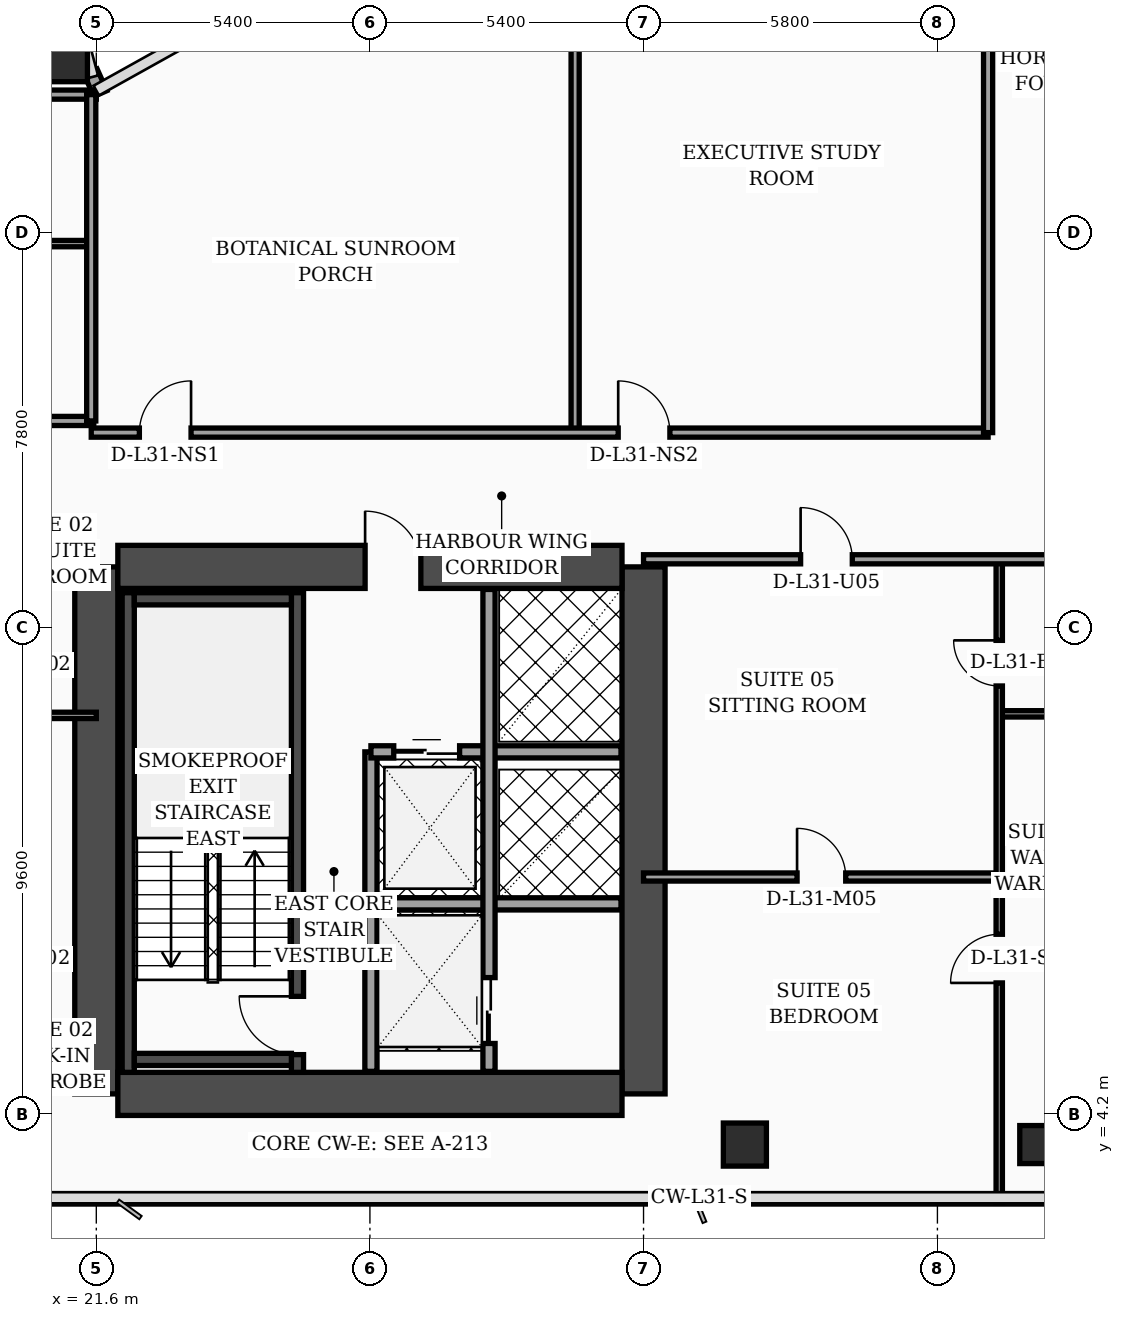
"""IFC4 building model, lengths in metres.
Left out: names, types, materials, properties, quantities, classifications, styles, units other than length and angle.
Written with IfcOpenShell. Run it as: python <this file> out.ifc"""

import sys

from ifc_helpers import new_model, si_unit, direction, frame, frame_2d, origin, origin_2d, place, context, subcontext, project, spatial, rectangle, hollow_rectangle, extrude, element, fill, save


model = new_model("IFC4")
c1 = context("Model", 3, precision=1e-05, world=origin(), true_north=direction((0.0, 1.0)))
c2 = subcontext(c1, "Body", "Model", "MODEL_VIEW")
j1 = project(units=[si_unit("LENGTHUNIT", "METRE"), si_unit("PLANEANGLEUNIT", "RADIAN")], contexts=[c1])
p1 = place(None, origin())
s1 = spatial("IfcSite", under=j1, at=p1, CompositionType="ELEMENT")
p2 = place(p1, origin())
s2 = spatial("IfcBuilding", under=s1, at=p2, CompositionType="ELEMENT")
p3 = place(p2, frame((0.0, 0.0, 127.8)))
s3 = spatial("IfcBuildingStorey", under=s2, at=p3, CompositionType="ELEMENT", Elevation=127.8)
for number, where, z_axis, x_axis in (
    (1, (21.6, 4.6, 0.0), (0.0, 0.0, 1.0), (0.0, 1.0, 0.0)),
    (2, (32.4, 4.6, 0.0), (0.0, 0.0, 1.0), (0.0, 1.0, 0.0)),
):
    element("IfcWall", number, at=place(p3, frame(where, z_axis=z_axis, x_axis=x_axis)), inside=s3, PredefinedType="SHEAR", context=c2, shape_type="SweptSolid", body=[
        extrude(rectangle(XDim=10.4, YDim=0.85, at=frame_2d((5.2, 0.0))), origin(), (0.0, 0.0, 1.0), 3.56),
    ])
p4 = place(p3, frame((22.025, 15.0, 0.0), z_axis=(0.0, 0.0, 1.0), x_axis=(1.0, 0.0, 0.0)))
e3 = element("IfcWall", 3, at=p4, inside=s3, PredefinedType="SHEAR", context=c2, shape_type="SweptSolid", body=[
    extrude(rectangle(XDim=9.95, YDim=0.85, at=frame_2d((4.975, 0.0))), origin(), (0.0, 0.0, 1.0), 3.56),
])
p5 = place(p4, frame((4.88, 0.0, 0.0)))
e4 = element("IfcOpeningElement", 4, at=p5, cuts=e3, PredefinedType="OPENING", context=c2, shape_type="SweptSolid", body=[
    extrude(rectangle(XDim=1.1, YDim=2.2, at=frame_2d((0.55, 1.1))), frame((0.0, 0.435, 0.0), z_axis=(0.0, -1.0, 0.0), x_axis=(1.0, 0.0, 0.0)), (0.0, 0.0, 1.0), 0.87),
])
p6 = place(p3, frame((22.025, 4.6, 0.0), z_axis=(0.0, 0.0, 1.0), x_axis=(1.0, 0.0, 0.0)))
e5 = element("IfcWall", 5, at=p6, inside=s3, PredefinedType="SHEAR", context=c2, shape_type="SweptSolid", body=[
    extrude(rectangle(XDim=9.95, YDim=0.85, at=frame_2d((4.975, 0.0))), origin(), (0.0, 0.0, 1.0), 3.56),
])
p7 = place(p3, frame((22.23, 5.025, 0.0), z_axis=(0.0, 0.0, 1.0), x_axis=(0.0, 1.0, 0.0)))
e6 = element("IfcWall", 6, at=p7, inside=s3, PredefinedType="SOLIDWALL", context=c2, shape_type="SweptSolid", body=[
    extrude(rectangle(XDim=9.465, YDim=0.24, at=frame_2d((4.732, 0.0))), origin(), (0.0, 0.0, 1.0), 3.56),
])
p8 = place(p3, frame((25.57, 5.025, 0.0), z_axis=(0.0, 0.0, 1.0), x_axis=(0.0, 1.0, 0.0)))
e7 = element("IfcWall", 7, at=p8, inside=s3, PredefinedType="SOLIDWALL", context=c2, shape_type="SweptSolid", body=[
    extrude(rectangle(XDim=9.465, YDim=0.24, at=frame_2d((4.732, 0.0))), origin(), (0.0, 0.0, 1.0), 3.56),
])
p9 = place(p8, frame((0.35, 0.0, 0.0)))
e8 = element("IfcOpeningElement", 8, at=p9, cuts=e7, PredefinedType="OPENING", context=c2, shape_type="SweptSolid", body=[
    extrude(rectangle(XDim=1.15, YDim=2.2, at=frame_2d((0.575, 1.1))), frame((0.0, 0.13, 0.0), z_axis=(0.0, -1.0, 0.0), x_axis=(1.0, 0.0, 0.0)), (0.0, 0.0, 1.0), 0.26),
])
for number, where, z_axis, x_axis in (
    (9, (22.35, 5.28, 0.0), (0.0, 0.0, 1.0), (1.0, 0.0, 0.0)),
    (10, (22.35, 14.37, 0.0), (0.0, 0.0, 1.0), (1.0, 0.0, 0.0)),
):
    element("IfcWall", number, at=place(p3, frame(where, z_axis=z_axis, x_axis=x_axis)), inside=s3, PredefinedType="SOLIDWALL", context=c2, shape_type="SweptSolid", body=[
        extrude(rectangle(XDim=3.1, YDim=0.24, at=frame_2d((1.55, 0.0))), origin(), (0.0, 0.0, 1.0), 3.56),
    ])
for number, where, z_axis, x_axis in (
    (11, (21.0, 25.0, 0.0), (0.0, 0.0, 1.0), (1.0, 0.0, 0.0)),
    (12, (34.4, 3.6, 0.0), (0.0, 0.0, 1.0), (1.0, 0.0, 0.0)),
):
    element("IfcColumn", number, at=place(p3, frame(where, z_axis=z_axis, x_axis=x_axis)), inside=s3, PredefinedType="COLUMN", context=c2, shape_type="SweptSolid", body=[
        extrude(hollow_rectangle(XDim=0.85, YDim=0.85, WallThickness=0.036, at=origin_2d()), origin(), (0.0, 0.0, 1.0), 3.56),
    ])
p10 = place(p3, frame((40.2, 3.6, 0.0), z_axis=(0.0, 0.0, 1.0), x_axis=(1.0, 0.0, 0.0)))
e13 = element("IfcColumn", 13, at=p10, inside=s3, PredefinedType="COLUMN", context=c2, shape_type="SweptSolid", body=[
    extrude(hollow_rectangle(XDim=0.75, YDim=0.75, WallThickness=0.032, at=origin_2d()), origin(), (0.0, 0.0, 1.0), 3.56),
])
p11 = place(p3, frame((21.68, 24.34, 0.0), z_axis=(0.0, 0.0, 1.0), x_axis=(-0.40758134973, 0.913168901875, 0.0)))
e14 = element("IfcWall", 14, at=p11, inside=s3, PredefinedType="SOLIDWALL", context=c2, shape_type="SweptSolid", body=[
    extrude(rectangle(XDim=0.471, YDim=0.28, at=frame_2d((0.235, 0.0))), origin(), (0.0, 0.0, 1.0), 3.56),
])
p12 = place(p3, frame((27.02, 5.045, 0.0), z_axis=(0.0, 0.0, 1.0), x_axis=(0.0, 1.0, 0.0)))
e15 = element("IfcWall", 15, at=p12, inside=s3, PredefinedType="SOLIDWALL", context=c2, shape_type="SweptSolid", body=[
    extrude(rectangle(XDim=6.305, YDim=0.24, at=frame_2d((3.153, 0.0))), origin(), (0.0, 0.0, 1.0), 3.56),
])
p13 = place(p3, frame((27.02, 11.35, 0.0), z_axis=(0.0, 0.0, 1.0), x_axis=(1.0, 0.0, 0.0)))
e16 = element("IfcWall", 16, at=p13, inside=s3, PredefinedType="SOLIDWALL", context=c2, shape_type="SweptSolid", body=[
    extrude(rectangle(XDim=4.935, YDim=0.24, at=frame_2d((2.468, 0.0))), origin(), (0.0, 0.0, 1.0), 3.56),
])
p14 = place(p13, frame((0.45, 0.0, 0.0)))
e17 = element("IfcOpeningElement", 17, at=p14, cuts=e16, PredefinedType="OPENING", context=c2, shape_type="SweptSolid", body=[
    extrude(rectangle(XDim=1.3, YDim=2.35, at=frame_2d((0.65, 1.175))), frame((0.0, 0.13, 0.0), z_axis=(0.0, -1.0, 0.0), x_axis=(1.0, 0.0, 0.0)), (0.0, 0.0, 1.0), 0.26),
])
p15 = place(p3, frame((27.02, 8.35, 0.0), z_axis=(0.0, 0.0, 1.0), x_axis=(1.0, 0.0, 0.0)))
e18 = element("IfcWall", 18, at=p15, inside=s3, PredefinedType="SOLIDWALL", context=c2, shape_type="SweptSolid", body=[
    extrude(rectangle(XDim=4.935, YDim=0.24, at=frame_2d((2.468, 0.0))), origin(), (0.0, 0.0, 1.0), 3.56),
])
p16 = place(p3, frame((29.35, 5.045, 0.0), z_axis=(0.0, 0.0, 1.0), x_axis=(0.0, 1.0, 0.0)))
e19 = element("IfcWall", 19, at=p16, inside=s3, PredefinedType="SOLIDWALL", context=c2, shape_type="SweptSolid", body=[
    extrude(rectangle(XDim=9.51, YDim=0.24, at=frame_2d((4.755, 0.0))), origin(), (0.0, 0.0, 1.0), 3.56),
])
p17 = place(p16, frame((0.55, 0.0, 0.0)))
e20 = element("IfcOpeningElement", 20, at=p17, cuts=e19, PredefinedType="OPENING", context=c2, shape_type="SweptSolid", body=[
    extrude(rectangle(XDim=1.3, YDim=2.35, at=frame_2d((0.65, 1.175))), frame((0.0, 0.13, 0.0), z_axis=(0.0, -1.0, 0.0), x_axis=(1.0, 0.0, 0.0)), (0.0, 0.0, 1.0), 0.26),
])
p18 = place(p3, frame((19.6, 12.07, 0.0), z_axis=(0.0, 0.0, 1.0), x_axis=(1.0, 0.0, 0.0)))
e21 = element("IfcWall", 21, at=p18, inside=s3, PredefinedType="PARTITIONING", context=c2, shape_type="SweptSolid", body=[
    extrude(rectangle(XDim=2.0, YDim=0.125, at=frame_2d((1.0, 0.0))), origin(), (0.0, 0.0, 1.0), 3.56),
])
p19 = place(p3, frame((15.15, 15.15, 0.0), z_axis=(0.0, 0.0, 1.0), x_axis=(1.0, 0.0, 0.0)))
e22 = element("IfcWall", 22, at=p19, inside=s3, PredefinedType="PARTITIONING", context=c2, shape_type="SweptSolid", body=[
    extrude(rectangle(XDim=6.45, YDim=0.18, at=frame_2d((3.225, 0.0))), origin(), (0.0, 0.0, 1.0), 2.49),
])
p20 = place(p19, frame((1.74, 0.0, 0.0)))
e23 = element("IfcOpeningElement", 23, at=p20, cuts=e22, PredefinedType="OPENING", context=c2, shape_type="SweptSolid", body=[
    extrude(rectangle(XDim=1.02, YDim=2.2, at=frame_2d((0.51, 1.1))), frame((0.0, 0.1, 0.0), z_axis=(0.0, -1.0, 0.0), x_axis=(1.0, 0.0, 0.0)), (0.0, 0.0, 1.0), 0.2),
])
p21 = place(p3, frame((17.65, 17.88, 0.0), z_axis=(0.0, 0.0, 1.0), x_axis=(1.0, 0.0, 0.0)))
e24 = element("IfcWall", 24, at=p21, inside=s3, PredefinedType="PARTITIONING", context=c2, shape_type="SweptSolid", body=[
    extrude(rectangle(XDim=3.9, YDim=0.18, at=frame_2d((1.95, 0.0))), origin(), (0.0, 0.0, 1.0), 3.09),
])
p22 = place(p3, frame((17.65, 21.38, 0.0), z_axis=(0.0, 0.0, 1.0), x_axis=(1.0, 0.0, 0.0)))
e25 = element("IfcWall", 25, at=p22, inside=s3, PredefinedType="PARTITIONING", context=c2, shape_type="SweptSolid", body=[
    extrude(rectangle(XDim=3.9, YDim=0.125, at=frame_2d((1.95, 0.0))), origin(), (0.0, 0.0, 1.0), 3.56),
])
p23 = place(p3, frame((17.65, 24.32, 0.0), z_axis=(0.0, 0.0, 1.0), x_axis=(1.0, 0.0, 0.0)))
e26 = element("IfcWall", 26, at=p23, inside=s3, PredefinedType="PARTITIONING", context=c2, shape_type="SweptSolid", body=[
    extrude(rectangle(XDim=3.95, YDim=0.18, at=frame_2d((1.975, 0.0))), origin(), (0.0, 0.0, 1.0), 3.56),
])
p24 = place(p3, frame((21.5, 17.88, 0.0), z_axis=(0.0, 0.0, 1.0), x_axis=(0.0, 1.0, 0.0)))
e27 = element("IfcWall", 27, at=p24, inside=s3, PredefinedType="PARTITIONING", context=c2, shape_type="SweptSolid", body=[
    extrude(rectangle(XDim=6.44, YDim=0.18, at=frame_2d((3.22, 0.0))), origin(), (0.0, 0.0, 1.0), 3.09),
])
p25 = place(p3, frame((39.42, 12.1, 0.0), z_axis=(0.0, 0.0, 1.0), x_axis=(1.0, 0.0, 0.0)))
e28 = element("IfcWall", 28, at=p25, inside=s3, PredefinedType="PARTITIONING", context=c2, shape_type="SweptSolid", body=[
    extrude(rectangle(XDim=2.13, YDim=0.125, at=frame_2d((1.065, 0.0))), origin(), (0.0, 0.0, 1.0), 3.56),
])
p26 = place(p3, frame((32.4, 8.88, 0.0), z_axis=(0.0, 0.0, 1.0), x_axis=(1.0, 0.0, 0.0)))
e29 = element("IfcWall", 29, at=p26, inside=s3, PredefinedType="PARTITIONING", context=c2, shape_type="SweptSolid", body=[
    extrude(rectangle(XDim=7.02, YDim=0.16, at=frame_2d((3.51, 0.0))), origin(), (0.0, 0.0, 1.0), 2.84),
])
p27 = place(p26, frame((3.03, 0.0, 0.0)))
e30 = element("IfcOpeningElement", 30, at=p27, cuts=e29, PredefinedType="OPENING", context=c2, shape_type="SweptSolid", body=[
    extrude(rectangle(XDim=0.96, YDim=2.2, at=frame_2d((0.48, 1.1))), frame((0.0, 0.09, 0.0), z_axis=(0.0, -1.0, 0.0), x_axis=(1.0, 0.0, 0.0)), (0.0, 0.0, 1.0), 0.18),
])
p28 = place(p3, frame((39.42, 2.44, 0.0), z_axis=(0.0, 0.0, 1.0), x_axis=(0.0, 1.0, 0.0)))
e31 = element("IfcWall", 31, at=p28, inside=s3, PredefinedType="PARTITIONING", context=c2, shape_type="SweptSolid", body=[
    extrude(rectangle(XDim=12.71, YDim=0.125, at=frame_2d((6.355, 0.0))), origin(), (0.0, 0.0, 1.0), 2.84),
])
p29 = place(p28, frame((4.35, 0.0, 0.0)))
e32 = element("IfcOpeningElement", 32, at=p29, cuts=e31, PredefinedType="OPENING", context=c2, shape_type="SweptSolid", body=[
    extrude(rectangle(XDim=0.96, YDim=2.2, at=frame_2d((0.48, 1.1))), frame((0.0, 0.073, 0.0), z_axis=(0.0, -1.0, 0.0), x_axis=(1.0, 0.0, 0.0)), (0.0, 0.0, 1.0), 0.145),
])
p30 = place(p28, frame((10.21, 0.0, 0.0)))
e33 = element("IfcOpeningElement", 33, at=p30, cuts=e31, PredefinedType="OPENING", context=c2, shape_type="SweptSolid", body=[
    extrude(rectangle(XDim=0.9, YDim=2.15, at=frame_2d((0.45, 1.075))), frame((0.0, 0.073, 0.0), z_axis=(0.0, -1.0, 0.0), x_axis=(1.0, 0.0, 0.0)), (0.0, 0.0, 1.0), 0.145),
])
p31 = place(p3, frame((32.4, 15.15, 0.0), z_axis=(0.0, 0.0, 1.0), x_axis=(1.0, 0.0, 0.0)))
e34 = element("IfcWall", 34, at=p31, inside=s3, PredefinedType="PARTITIONING", context=c2, shape_type="SweptSolid", body=[
    extrude(rectangle(XDim=9.15, YDim=0.18, at=frame_2d((4.575, 0.0))), origin(), (0.0, 0.0, 1.0), 2.84),
])
p32 = place(p31, frame((3.1, 0.0, 0.0)))
e35 = element("IfcOpeningElement", 35, at=p32, cuts=e34, PredefinedType="OPENING", context=c2, shape_type="SweptSolid", body=[
    extrude(rectangle(XDim=1.02, YDim=2.2, at=frame_2d((0.51, 1.1))), frame((0.0, 0.1, 0.0), z_axis=(0.0, -1.0, 0.0), x_axis=(1.0, 0.0, 0.0)), (0.0, 0.0, 1.0), 0.2),
])
p33 = place(p3, frame((31.05, 17.65, 0.0), z_axis=(0.0, 0.0, 1.0), x_axis=(0.0, 1.0, 0.0)))
e36 = element("IfcWall", 36, at=p33, inside=s3, PredefinedType="PARTITIONING", context=c2, shape_type="SweptSolid", body=[
    extrude(rectangle(XDim=12.1, YDim=0.16, at=frame_2d((6.05, 0.0))), origin(), (0.0, 0.0, 1.0), 2.84),
])
p34 = place(p3, frame((21.5, 17.65, 0.0), z_axis=(0.0, 0.0, 1.0), x_axis=(1.0, 0.0, 0.0)))
e37 = element("IfcWall", 37, at=p34, inside=s3, PredefinedType="PARTITIONING", context=c2, shape_type="SweptSolid", body=[
    extrude(rectangle(XDim=17.7, YDim=0.18, at=frame_2d((8.85, 0.0))), origin(), (0.0, 0.0, 1.0), 2.84),
])
p35 = place(p34, frame((0.95, 0.0, 0.0)))
e38 = element("IfcOpeningElement", 38, at=p35, cuts=e37, PredefinedType="OPENING", context=c2, shape_type="SweptSolid", body=[
    extrude(rectangle(XDim=1.02, YDim=2.2, at=frame_2d((0.51, 1.1))), frame((0.0, 0.1, 0.0), z_axis=(0.0, -1.0, 0.0), x_axis=(1.0, 0.0, 0.0)), (0.0, 0.0, 1.0), 0.2),
])
p36 = place(p34, frame((10.4, 0.0, 0.0)))
e39 = element("IfcOpeningElement", 39, at=p36, cuts=e37, PredefinedType="OPENING", context=c2, shape_type="SweptSolid", body=[
    extrude(rectangle(XDim=1.02, YDim=2.2, at=frame_2d((0.51, 1.1))), frame((0.0, 0.1, 0.0), z_axis=(0.0, -1.0, 0.0), x_axis=(1.0, 0.0, 0.0)), (0.0, 0.0, 1.0), 0.2),
])
p37 = place(p3, frame((39.2, 17.65, 0.0), z_axis=(0.0, 0.0, 1.0), x_axis=(0.0, 1.0, 0.0)))
e40 = element("IfcWall", 40, at=p37, inside=s3, PredefinedType="PARTITIONING", context=c2, shape_type="SweptSolid", body=[
    extrude(rectangle(XDim=16.64, YDim=0.18, at=frame_2d((8.32, 0.0))), origin(), (0.0, 0.0, 1.0), 2.84),
])
p38 = place(p14, origin())
e41 = element("IfcDoor", 41, at=p38, inside=s3, OperationType="DOUBLE_DOOR_SLIDING", PredefinedType="DOOR", context=c2, shape_type="SweptSolid", body=[
    extrude(rectangle(XDim=1.3, YDim=2.35, at=frame_2d((0.65, 1.175))), frame((0.0, 0.025, 0.0), z_axis=(0.0, -1.0, 0.0), x_axis=(1.0, 0.0, 0.0)), (0.0, 0.0, 1.0), 0.05),
])
fill(e17, e41)
p39 = place(p17, origin())
e42 = element("IfcDoor", 42, at=p39, inside=s3, OperationType="DOUBLE_DOOR_SLIDING", PredefinedType="DOOR", context=c2, shape_type="SweptSolid", body=[
    extrude(rectangle(XDim=1.3, YDim=2.35, at=frame_2d((0.65, 1.175))), frame((0.0, 0.025, 0.0), z_axis=(0.0, -1.0, 0.0), x_axis=(1.0, 0.0, 0.0)), (0.0, 0.0, 1.0), 0.05),
])
fill(e20, e42)
p40 = place(p27, origin())
e43 = element("IfcDoor", 43, at=p40, inside=s3, OperationType="SINGLE_SWING_LEFT", PredefinedType="DOOR", context=c2, shape_type="SweptSolid", body=[
    extrude(rectangle(XDim=0.96, YDim=2.2, at=frame_2d((0.48, 1.1))), frame((0.0, 0.025, 0.0), z_axis=(0.0, -1.0, 0.0), x_axis=(1.0, 0.0, 0.0)), (0.0, 0.0, 1.0), 0.05),
])
fill(e30, e43)
p41 = place(p29, origin())
e44 = element("IfcDoor", 44, at=p41, inside=s3, OperationType="SINGLE_SWING_LEFT", PredefinedType="DOOR", context=c2, shape_type="SweptSolid", body=[
    extrude(rectangle(XDim=0.96, YDim=2.2, at=frame_2d((0.48, 1.1))), frame((0.0, 0.025, 0.0), z_axis=(0.0, -1.0, 0.0), x_axis=(1.0, 0.0, 0.0)), (0.0, 0.0, 1.0), 0.05),
])
fill(e32, e44)
p42 = place(p30, origin())
e45 = element("IfcDoor", 45, at=p42, inside=s3, OperationType="SINGLE_SWING_RIGHT", PredefinedType="DOOR", context=c2, shape_type="SweptSolid", body=[
    extrude(rectangle(XDim=0.9, YDim=2.15, at=frame_2d((0.45, 1.075))), frame((0.0, 0.025, 0.0), z_axis=(0.0, -1.0, 0.0), x_axis=(1.0, 0.0, 0.0)), (0.0, 0.0, 1.0), 0.05),
])
fill(e33, e45)
p43 = place(p32, origin())
e46 = element("IfcDoor", 46, at=p43, inside=s3, OperationType="SINGLE_SWING_LEFT", PredefinedType="DOOR", context=c2, shape_type="SweptSolid", body=[
    extrude(rectangle(XDim=1.02, YDim=2.2, at=frame_2d((0.51, 1.1))), frame((0.0, 0.025, 0.0), z_axis=(0.0, -1.0, 0.0), x_axis=(1.0, 0.0, 0.0)), (0.0, 0.0, 1.0), 0.05),
])
fill(e35, e46)
p44 = place(p35, origin())
e47 = element("IfcDoor", 47, at=p44, inside=s3, OperationType="SINGLE_SWING_RIGHT", PredefinedType="DOOR", context=c2, shape_type="SweptSolid", body=[
    extrude(rectangle(XDim=1.02, YDim=2.2, at=frame_2d((0.51, 1.1))), frame((0.0, 0.025, 0.0), z_axis=(0.0, -1.0, 0.0), x_axis=(1.0, 0.0, 0.0)), (0.0, 0.0, 1.0), 0.05),
])
fill(e38, e47)
p45 = place(p36, origin())
e48 = element("IfcDoor", 48, at=p45, inside=s3, OperationType="SINGLE_SWING_LEFT", PredefinedType="DOOR", context=c2, shape_type="SweptSolid", body=[
    extrude(rectangle(XDim=1.02, YDim=2.2, at=frame_2d((0.51, 1.1))), frame((0.0, 0.025, 0.0), z_axis=(0.0, -1.0, 0.0), x_axis=(1.0, 0.0, 0.0)), (0.0, 0.0, 1.0), 0.05),
])
fill(e39, e48)
p46 = place(p9, origin())
e49 = element("IfcDoor", 49, at=p46, inside=s3, OperationType="SINGLE_SWING_RIGHT", PredefinedType="DOOR", context=c2, shape_type="SweptSolid", body=[
    extrude(rectangle(XDim=1.15, YDim=2.2, at=frame_2d((0.575, 1.1))), frame((0.0, 0.025, 0.0), z_axis=(0.0, -1.0, 0.0), x_axis=(1.0, 0.0, 0.0)), (0.0, 0.0, 1.0), 0.05),
])
fill(e8, e49)
p47 = place(p5, origin())
e50 = element("IfcDoor", 50, at=p47, inside=s3, OperationType="SINGLE_SWING_LEFT", PredefinedType="DOOR", context=c2, shape_type="SweptSolid", body=[
    extrude(rectangle(XDim=1.1, YDim=2.2, at=frame_2d((0.55, 1.1))), frame((0.0, 0.025, 0.0), z_axis=(0.0, -1.0, 0.0), x_axis=(1.0, 0.0, 0.0)), (0.0, 0.0, 1.0), 0.05),
])
fill(e4, e50)
save(model, sys.argv[1])
